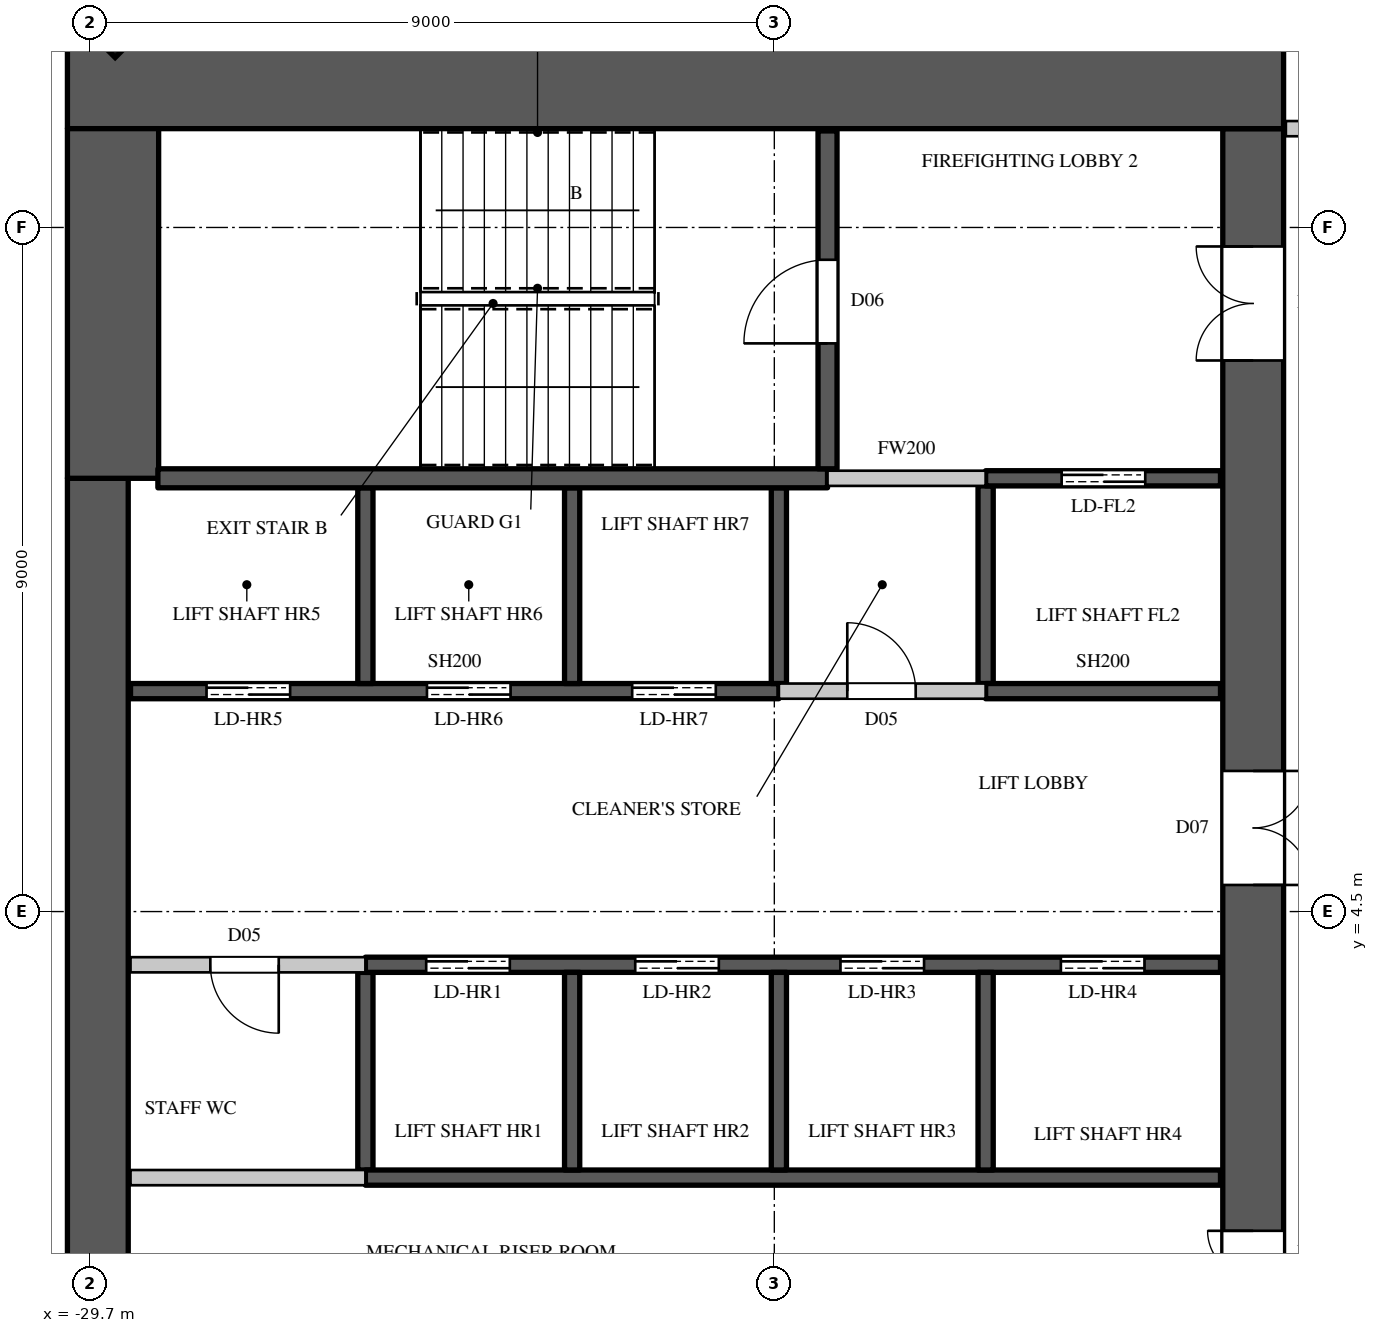
"""IFC4 building model, lengths in metres.
Left out: names, types, materials, properties, quantities, classifications, styles, units other than length and angle.
Written with IfcOpenShell. Run it as: python <this file> out.ifc"""

import sys

from ifc_helpers import new_model, si_unit, direction, frame, frame_2d, origin, origin_2d, place, context, subcontext, project, spatial, rectangle, extrude, element, fill, save


model = new_model("IFC4")
c1 = context("Model", 3, precision=1e-05, world=origin(), true_north=direction((0.0, 1.0)))
c2 = subcontext(c1, "Body", "Model", "MODEL_VIEW")
j1 = project(units=[si_unit("LENGTHUNIT", "METRE"), si_unit("PLANEANGLEUNIT", "RADIAN")], contexts=[c1])
p1 = place(None, origin())
s1 = spatial("IfcSite", under=j1, at=p1, CompositionType="ELEMENT")
p2 = place(p1, origin())
s2 = spatial("IfcBuilding", under=s1, at=p2, CompositionType="ELEMENT")
p3 = place(p2, frame((0.0, 0.0, 185.1)))
s3 = spatial("IfcBuildingStorey", under=s2, at=p3, CompositionType="ELEMENT", Elevation=185.1)
p4 = place(p3, frame((-29.443, 16.443, 0.0), z_axis=(0.0, 0.0, 1.0), x_axis=(-0.707106781187, -0.707106781187, 0.0)))
e1 = element("IfcColumn", 1, at=p4, inside=s3, PredefinedType="COLUMN", context=c2, shape_type="SweptSolid", body=[
    extrude(rectangle(XDim=0.9, YDim=1.1, at=origin_2d()), origin(), (0.0, 0.0, 1.0), 4.1),
])
p5 = place(p3, frame((-30.0, 15.4, 0.0), z_axis=(0.0, 0.0, 1.0), x_axis=(1.0, 0.0, 0.0)))
e2 = element("IfcWall", 2, at=p5, inside=s3, PredefinedType="SHEAR", context=c2, shape_type="SweptSolid", body=[
    extrude(rectangle(XDim=16.0, YDim=1.2, at=frame_2d((8.0, 0.0))), origin(), (0.0, 0.0, 1.0), 4.1),
])
p6 = place(p3, frame((-14.4, -14.8, 0.0), z_axis=(0.0, 0.0, 1.0), x_axis=(0.0, 1.0, 0.0)))
e3 = element("IfcWall", 3, at=p6, inside=s3, PredefinedType="SHEAR", context=c2, shape_type="SweptSolid", body=[
    extrude(rectangle(XDim=29.6, YDim=0.8, at=frame_2d((14.8, 0.0))), origin(), (0.0, 0.0, 1.0), 4.1),
])
p7 = place(p6, frame((1.55, 0.0, 0.0)))
e4 = element("IfcOpeningElement", 4, at=p7, cuts=e3, PredefinedType="OPENING", context=c2, shape_type="SweptSolid", body=[
    extrude(rectangle(XDim=1.5, YDim=2.4, at=frame_2d((0.75, 1.2))), frame((0.0, 0.41, 0.0), z_axis=(0.0, -1.0, 0.0), x_axis=(1.0, 0.0, 0.0)), (0.0, 0.0, 1.0), 0.82),
])
p8 = place(p6, frame((26.55, 0.0, 0.0)))
e5 = element("IfcOpeningElement", 5, at=p8, cuts=e3, PredefinedType="OPENING", context=c2, shape_type="SweptSolid", body=[
    extrude(rectangle(XDim=1.5, YDim=2.4, at=frame_2d((0.75, 1.2))), frame((0.0, 0.41, 0.0), z_axis=(0.0, -1.0, 0.0), x_axis=(1.0, 0.0, 0.0)), (0.0, 0.0, 1.0), 0.82),
])
p9 = place(p6, frame((8.45, 0.0, 0.0)))
e6 = element("IfcOpeningElement", 6, at=p9, cuts=e3, PredefinedType="OPENING", context=c2, shape_type="SweptSolid", body=[
    extrude(rectangle(XDim=1.5, YDim=2.4, at=frame_2d((0.75, 1.2))), frame((0.0, 0.41, 0.0), z_axis=(0.0, -1.0, 0.0), x_axis=(1.0, 0.0, 0.0)), (0.0, 0.0, 1.0), 0.82),
])
p10 = place(p6, frame((19.65, 0.0, 0.0)))
e7 = element("IfcOpeningElement", 7, at=p10, cuts=e3, PredefinedType="OPENING", context=c2, shape_type="SweptSolid", body=[
    extrude(rectangle(XDim=1.5, YDim=2.4, at=frame_2d((0.75, 1.2))), frame((0.0, 0.41, 0.0), z_axis=(0.0, -1.0, 0.0), x_axis=(1.0, 0.0, 0.0)), (0.0, 0.0, 1.0), 0.82),
])
p11 = place(p6, frame((14.5, 0.0, 0.0)))
e8 = element("IfcOpeningElement", 8, at=p11, cuts=e3, PredefinedType="OPENING", context=c2, shape_type="SweptSolid", body=[
    extrude(rectangle(XDim=0.6, YDim=2.0, at=frame_2d((0.3, 1.0))), frame((0.0, 0.41, 0.0), z_axis=(0.0, -1.0, 0.0), x_axis=(1.0, 0.0, 0.0)), (0.0, 0.0, 1.0), 0.82),
])
p12 = place(p3, frame((-29.6, -10.2, 0.0), z_axis=(0.0, 0.0, 1.0), x_axis=(0.0, 1.0, 0.0)))
e9 = element("IfcWall", 9, at=p12, inside=s3, PredefinedType="SHEAR", context=c2, shape_type="SweptSolid", body=[
    extrude(rectangle(XDim=20.4, YDim=0.8, at=frame_2d((10.2, 0.0))), origin(), (0.0, 0.0, 1.0), 4.1),
])
p13 = place(p3, frame((-29.4, 10.2, 0.0), z_axis=(0.0, 0.0, 1.0), x_axis=(0.0, 1.0, 0.0)))
e10 = element("IfcWall", 10, at=p13, inside=s3, PredefinedType="SHEAR", context=c2, shape_type="SweptSolid", body=[
    extrude(rectangle(XDim=4.6, YDim=1.2, at=frame_2d((2.3, 0.0))), origin(), (0.0, 0.0, 1.0), 4.1),
])
p14 = place(p3, frame((-29.17, 3.8, 0.0), z_axis=(0.0, 0.0, 1.0), x_axis=(1.0, 0.0, 0.0)))
e11 = element("IfcWall", 11, at=p14, inside=s3, PredefinedType="PARTITIONING", context=c2, shape_type="SweptSolid", body=[
    extrude(rectangle(XDim=3.09, YDim=0.2, at=frame_2d((1.545, 0.0))), origin(), (0.0, 0.0, 1.0), 3.8),
])
p15 = place(p14, frame((1.05, 0.0, 0.0)))
e12 = element("IfcOpeningElement", 12, at=p15, cuts=e11, PredefinedType="OPENING", context=c2, shape_type="SweptSolid", body=[
    extrude(rectangle(XDim=0.9, YDim=2.2, at=frame_2d((0.45, 1.1))), frame((0.0, 0.11, 0.0), z_axis=(0.0, -1.0, 0.0), x_axis=(1.0, 0.0, 0.0)), (0.0, 0.0, 1.0), 0.22),
])
p16 = place(p3, frame((-20.64, 7.4, 0.0), z_axis=(0.0, 0.0, 1.0), x_axis=(1.0, 0.0, 0.0)))
e13 = element("IfcWall", 13, at=p16, inside=s3, PredefinedType="PARTITIONING", context=c2, shape_type="SweptSolid", body=[
    extrude(rectangle(XDim=2.72, YDim=0.2, at=frame_2d((1.36, 0.0))), origin(), (0.0, 0.0, 1.0), 3.8),
])
p17 = place(p16, frame((0.9, 0.0, 0.0)))
e14 = element("IfcOpeningElement", 14, at=p17, cuts=e13, PredefinedType="OPENING", context=c2, shape_type="SweptSolid", body=[
    extrude(rectangle(XDim=0.9, YDim=2.2, at=frame_2d((0.45, 1.1))), frame((0.0, 0.11, 0.0), z_axis=(0.0, -1.0, 0.0), x_axis=(1.0, 0.0, 0.0)), (0.0, 0.0, 1.0), 0.22),
])
p18 = place(p3, frame((-20.0, 10.2, 0.0), z_axis=(0.0, 0.0, 1.0), x_axis=(1.0, 0.0, 0.0)))
e15 = element("IfcWall", 15, at=p18, inside=s3, PredefinedType="PARTITIONING", context=c2, shape_type="SweptSolid", body=[
    extrude(rectangle(XDim=2.08, YDim=0.2, at=frame_2d((1.04, 0.0))), origin(), (0.0, 0.0, 1.0), 3.8),
])
p19 = place(p3, frame((-13.97, 14.8, 0.0), z_axis=(0.0, 0.0, 1.0), x_axis=(1.0, 0.0, 0.0)))
e16 = element("IfcWall", 16, at=p19, inside=s3, PredefinedType="PARTITIONING", context=c2, shape_type="SweptSolid", body=[
    extrude(rectangle(XDim=2.87, YDim=0.2, at=frame_2d((1.435, 0.0))), origin(), (0.0, 0.0, 1.0), 3.8),
])
p20 = place(p3, frame((-29.17, 1.0, 0.0), z_axis=(0.0, 0.0, 1.0), x_axis=(1.0, 0.0, 0.0)))
e17 = element("IfcWall", 17, at=p20, inside=s3, PredefinedType="PARTITIONING", context=c2, shape_type="SweptSolid", body=[
    extrude(rectangle(XDim=3.09, YDim=0.2, at=frame_2d((1.545, 0.0))), origin(), (0.0, 0.0, 1.0), 3.8),
])
p21 = place(p3, frame((-29.17, 7.4, 0.0), z_axis=(0.0, 0.0, 1.0), x_axis=(1.0, 0.0, 0.0)))
e18 = element("IfcWall", 18, at=p21, inside=s3, PredefinedType="SHEAR", context=c2, shape_type="SweptSolid", body=[
    extrude(rectangle(XDim=8.53, YDim=0.2, at=frame_2d((4.265, 0.0))), origin(), (0.0, 0.0, 1.0), 3.8),
])
p22 = place(p21, frame((1.0, 0.0, 0.0)))
e19 = element("IfcOpeningElement", 19, at=p22, cuts=e18, PredefinedType="OPENING", context=c2, shape_type="SweptSolid", body=[
    extrude(rectangle(XDim=1.1, YDim=2.2, at=frame_2d((0.55, 1.1))), frame((0.0, 0.11, 0.0), z_axis=(0.0, -1.0, 0.0), x_axis=(1.0, 0.0, 0.0)), (0.0, 0.0, 1.0), 0.22),
])
p23 = place(p21, frame((3.9, 0.0, 0.0)))
e20 = element("IfcOpeningElement", 20, at=p23, cuts=e18, PredefinedType="OPENING", context=c2, shape_type="SweptSolid", body=[
    extrude(rectangle(XDim=1.1, YDim=2.2, at=frame_2d((0.55, 1.1))), frame((0.0, 0.11, 0.0), z_axis=(0.0, -1.0, 0.0), x_axis=(1.0, 0.0, 0.0)), (0.0, 0.0, 1.0), 0.22),
])
p24 = place(p21, frame((6.6, 0.0, 0.0)))
e21 = element("IfcOpeningElement", 21, at=p24, cuts=e18, PredefinedType="OPENING", context=c2, shape_type="SweptSolid", body=[
    extrude(rectangle(XDim=1.1, YDim=2.2, at=frame_2d((0.55, 1.1))), frame((0.0, 0.11, 0.0), z_axis=(0.0, -1.0, 0.0), x_axis=(1.0, 0.0, 0.0)), (0.0, 0.0, 1.0), 0.22),
])
p25 = place(p3, frame((-26.08, 1.1, 0.0), z_axis=(0.0, 0.0, 1.0), x_axis=(0.0, 1.0, 0.0)))
e22 = element("IfcWall", 22, at=p25, inside=s3, PredefinedType="SHEAR", context=c2, shape_type="SweptSolid", body=[
    extrude(rectangle(XDim=2.6, YDim=0.2, at=frame_2d((1.3, 0.0))), origin(), (0.0, 0.0, 1.0), 3.8),
])
p26 = place(p3, frame((-26.08, 1.0, 0.0), z_axis=(0.0, 0.0, 1.0), x_axis=(1.0, 0.0, 0.0)))
e23 = element("IfcWall", 23, at=p26, inside=s3, PredefinedType="SHEAR", context=c2, shape_type="SweptSolid", body=[
    extrude(rectangle(XDim=11.25, YDim=0.2, at=frame_2d((5.625, 0.0))), origin(), (0.0, 0.0, 1.0), 3.8),
])
p27 = place(p3, frame((-26.08, 3.8, 0.0), z_axis=(0.0, 0.0, 1.0), x_axis=(1.0, 0.0, 0.0)))
e24 = element("IfcWall", 24, at=p27, inside=s3, PredefinedType="SHEAR", context=c2, shape_type="SweptSolid", body=[
    extrude(rectangle(XDim=11.25, YDim=0.2, at=frame_2d((5.625, 0.0))), origin(), (0.0, 0.0, 1.0), 3.8),
])
p28 = place(p27, frame((0.8, 0.0, 0.0)))
e25 = element("IfcOpeningElement", 25, at=p28, cuts=e24, PredefinedType="OPENING", context=c2, shape_type="SweptSolid", body=[
    extrude(rectangle(XDim=1.1, YDim=2.2, at=frame_2d((0.55, 1.1))), frame((0.0, 0.11, 0.0), z_axis=(0.0, -1.0, 0.0), x_axis=(1.0, 0.0, 0.0)), (0.0, 0.0, 1.0), 0.22),
])
p29 = place(p27, frame((3.55, 0.0, 0.0)))
e26 = element("IfcOpeningElement", 26, at=p29, cuts=e24, PredefinedType="OPENING", context=c2, shape_type="SweptSolid", body=[
    extrude(rectangle(XDim=1.1, YDim=2.2, at=frame_2d((0.55, 1.1))), frame((0.0, 0.11, 0.0), z_axis=(0.0, -1.0, 0.0), x_axis=(1.0, 0.0, 0.0)), (0.0, 0.0, 1.0), 0.22),
])
p30 = place(p27, frame((6.25, 0.0, 0.0)))
e27 = element("IfcOpeningElement", 27, at=p30, cuts=e24, PredefinedType="OPENING", context=c2, shape_type="SweptSolid", body=[
    extrude(rectangle(XDim=1.1, YDim=2.2, at=frame_2d((0.55, 1.1))), frame((0.0, 0.11, 0.0), z_axis=(0.0, -1.0, 0.0), x_axis=(1.0, 0.0, 0.0)), (0.0, 0.0, 1.0), 0.22),
])
p31 = place(p27, frame((9.15, 0.0, 0.0)))
e28 = element("IfcOpeningElement", 28, at=p31, cuts=e24, PredefinedType="OPENING", context=c2, shape_type="SweptSolid", body=[
    extrude(rectangle(XDim=1.1, YDim=2.2, at=frame_2d((0.55, 1.1))), frame((0.0, 0.11, 0.0), z_axis=(0.0, -1.0, 0.0), x_axis=(1.0, 0.0, 0.0)), (0.0, 0.0, 1.0), 0.22),
])
p32 = place(p3, frame((-26.08, 7.5, 0.0), z_axis=(0.0, 0.0, 1.0), x_axis=(0.0, 1.0, 0.0)))
e29 = element("IfcWall", 29, at=p32, inside=s3, PredefinedType="SHEAR", context=c2, shape_type="SweptSolid", body=[
    extrude(rectangle(XDim=2.575, YDim=0.2, at=frame_2d((1.288, 0.0))), origin(), (0.0, 0.0, 1.0), 4.1),
])
p33 = place(p3, frame((-23.36, 1.1, 0.0), z_axis=(0.0, 0.0, 1.0), x_axis=(0.0, 1.0, 0.0)))
e30 = element("IfcWall", 30, at=p33, inside=s3, PredefinedType="SHEAR", context=c2, shape_type="SweptSolid", body=[
    extrude(rectangle(XDim=2.6, YDim=0.2, at=frame_2d((1.3, 0.0))), origin(), (0.0, 0.0, 1.0), 4.1),
])
p34 = place(p3, frame((-23.36, 7.5, 0.0), z_axis=(0.0, 0.0, 1.0), x_axis=(0.0, 1.0, 0.0)))
e31 = element("IfcWall", 31, at=p34, inside=s3, PredefinedType="SHEAR", context=c2, shape_type="SweptSolid", body=[
    extrude(rectangle(XDim=2.575, YDim=0.2, at=frame_2d((1.288, 0.0))), origin(), (0.0, 0.0, 1.0), 4.1),
])
p35 = place(p3, frame((-20.64, 1.1, 0.0), z_axis=(0.0, 0.0, 1.0), x_axis=(0.0, 1.0, 0.0)))
e32 = element("IfcWall", 32, at=p35, inside=s3, PredefinedType="SHEAR", context=c2, shape_type="SweptSolid", body=[
    extrude(rectangle(XDim=2.6, YDim=0.2, at=frame_2d((1.3, 0.0))), origin(), (0.0, 0.0, 1.0), 4.1),
])
p36 = place(p3, frame((-20.64, 7.5, 0.0), z_axis=(0.0, 0.0, 1.0), x_axis=(0.0, 1.0, 0.0)))
e33 = element("IfcWall", 33, at=p36, inside=s3, PredefinedType="SHEAR", context=c2, shape_type="SweptSolid", body=[
    extrude(rectangle(XDim=2.575, YDim=0.2, at=frame_2d((1.288, 0.0))), origin(), (0.0, 0.0, 1.0), 3.8),
])
p37 = place(p3, frame((-17.92, 1.1, 0.0), z_axis=(0.0, 0.0, 1.0), x_axis=(0.0, 1.0, 0.0)))
e34 = element("IfcWall", 34, at=p37, inside=s3, PredefinedType="SHEAR", context=c2, shape_type="SweptSolid", body=[
    extrude(rectangle(XDim=2.6, YDim=0.2, at=frame_2d((1.3, 0.0))), origin(), (0.0, 0.0, 1.0), 4.1),
])
p38 = place(p3, frame((-17.92, 7.5, 0.0), z_axis=(0.0, 0.0, 1.0), x_axis=(0.0, 1.0, 0.0)))
e35 = element("IfcWall", 35, at=p38, inside=s3, PredefinedType="SHEAR", context=c2, shape_type="SweptSolid", body=[
    extrude(rectangle(XDim=2.6, YDim=0.2, at=frame_2d((1.3, 0.0))), origin(), (0.0, 0.0, 1.0), 3.8),
])
p39 = place(p3, frame((-17.92, 7.4, 0.0), z_axis=(0.0, 0.0, 1.0), x_axis=(1.0, 0.0, 0.0)))
e36 = element("IfcWall", 36, at=p39, inside=s3, PredefinedType="SHEAR", context=c2, shape_type="SweptSolid", body=[
    extrude(rectangle(XDim=3.09, YDim=0.2, at=frame_2d((1.545, 0.0))), origin(), (0.0, 0.0, 1.0), 3.8),
])
p40 = place(p3, frame((-17.92, 10.2, 0.0), z_axis=(0.0, 0.0, 1.0), x_axis=(1.0, 0.0, 0.0)))
e37 = element("IfcWall", 37, at=p40, inside=s3, PredefinedType="SHEAR", context=c2, shape_type="SweptSolid", body=[
    extrude(rectangle(XDim=3.09, YDim=0.2, at=frame_2d((1.545, 0.0))), origin(), (0.0, 0.0, 1.0), 3.8),
])
p41 = place(p40, frame((1.0, 0.0, 0.0)))
e38 = element("IfcOpeningElement", 38, at=p41, cuts=e37, PredefinedType="OPENING", context=c2, shape_type="SweptSolid", body=[
    extrude(rectangle(XDim=1.1, YDim=2.2, at=frame_2d((0.55, 1.1))), frame((0.0, 0.11, 0.0), z_axis=(0.0, -1.0, 0.0), x_axis=(1.0, 0.0, 0.0)), (0.0, 0.0, 1.0), 0.22),
])
p42 = place(p3, frame((-28.81, 10.2, 0.0), z_axis=(0.0, 0.0, 1.0), x_axis=(1.0, 0.0, 0.0)))
e39 = element("IfcWall", 39, at=p42, inside=s3, PredefinedType="SHEAR", context=c2, shape_type="SweptSolid", body=[
    extrude(rectangle(XDim=8.81, YDim=0.25, at=frame_2d((4.405, 0.0))), origin(), (0.0, 0.0, 1.0), 3.8),
])
p43 = place(p3, frame((-20.0, 10.325, 0.0), z_axis=(0.0, 0.0, 1.0), x_axis=(0.0, 1.0, 0.0)))
e40 = element("IfcWall", 40, at=p43, inside=s3, PredefinedType="SHEAR", context=c2, shape_type="SweptSolid", body=[
    extrude(rectangle(XDim=4.445, YDim=0.25, at=frame_2d((2.223, 0.0))), origin(), (0.0, 0.0, 1.0), 3.8),
])
p44 = place(p43, frame((1.65, 0.0, 0.0)))
e41 = element("IfcOpeningElement", 41, at=p44, cuts=e40, PredefinedType="OPENING", context=c2, shape_type="SweptSolid", body=[
    extrude(rectangle(XDim=1.1, YDim=2.2, at=frame_2d((0.55, 1.1))), frame((0.0, 0.135, 0.0), z_axis=(0.0, -1.0, 0.0), x_axis=(1.0, 0.0, 0.0)), (0.0, 0.0, 1.0), 0.27),
])
p45 = place(p44, origin())
e42 = element("IfcDoor", 42, at=p45, inside=s3, OperationType="SINGLE_SWING_LEFT", PredefinedType="DOOR", context=c2, shape_type="SweptSolid", body=[
    extrude(rectangle(XDim=1.1, YDim=2.2, at=frame_2d((0.55, 1.1))), frame((0.0, 0.025, 0.0), z_axis=(0.0, -1.0, 0.0), x_axis=(1.0, 0.0, 0.0)), (0.0, 0.0, 1.0), 0.05),
])
fill(e41, e42)
p46 = place(p15, origin())
e43 = element("IfcDoor", 43, at=p46, inside=s3, OperationType="SINGLE_SWING_LEFT", PredefinedType="DOOR", context=c2, shape_type="SweptSolid", body=[
    extrude(rectangle(XDim=0.9, YDim=2.2, at=frame_2d((0.45, 1.1))), frame((0.0, 0.025, 0.0), z_axis=(0.0, -1.0, 0.0), x_axis=(1.0, 0.0, 0.0)), (0.0, 0.0, 1.0), 0.05),
])
fill(e12, e43)
p47 = place(p17, origin())
e44 = element("IfcDoor", 44, at=p47, inside=s3, OperationType="SINGLE_SWING_LEFT", PredefinedType="DOOR", context=c2, shape_type="SweptSolid", body=[
    extrude(rectangle(XDim=0.9, YDim=2.2, at=frame_2d((0.45, 1.1))), frame((0.0, 0.025, 0.0), z_axis=(0.0, -1.0, 0.0), x_axis=(1.0, 0.0, 0.0)), (0.0, 0.0, 1.0), 0.05),
])
fill(e14, e44)
p48 = place(p28, origin())
e45 = element("IfcDoor", 45, at=p48, inside=s3, OperationType="DOUBLE_DOOR_SLIDING", PredefinedType="DOOR", context=c2, shape_type="SweptSolid", body=[
    extrude(rectangle(XDim=1.1, YDim=2.2, at=frame_2d((0.55, 1.1))), frame((0.0, 0.025, 0.0), z_axis=(0.0, -1.0, 0.0), x_axis=(1.0, 0.0, 0.0)), (0.0, 0.0, 1.0), 0.05),
])
fill(e25, e45)
p49 = place(p29, origin())
e46 = element("IfcDoor", 46, at=p49, inside=s3, OperationType="DOUBLE_DOOR_SLIDING", PredefinedType="DOOR", context=c2, shape_type="SweptSolid", body=[
    extrude(rectangle(XDim=1.1, YDim=2.2, at=frame_2d((0.55, 1.1))), frame((0.0, 0.025, 0.0), z_axis=(0.0, -1.0, 0.0), x_axis=(1.0, 0.0, 0.0)), (0.0, 0.0, 1.0), 0.05),
])
fill(e26, e46)
p50 = place(p30, origin())
e47 = element("IfcDoor", 47, at=p50, inside=s3, OperationType="DOUBLE_DOOR_SLIDING", PredefinedType="DOOR", context=c2, shape_type="SweptSolid", body=[
    extrude(rectangle(XDim=1.1, YDim=2.2, at=frame_2d((0.55, 1.1))), frame((0.0, 0.025, 0.0), z_axis=(0.0, -1.0, 0.0), x_axis=(1.0, 0.0, 0.0)), (0.0, 0.0, 1.0), 0.05),
])
fill(e27, e47)
p51 = place(p31, origin())
e48 = element("IfcDoor", 48, at=p51, inside=s3, OperationType="DOUBLE_DOOR_SLIDING", PredefinedType="DOOR", context=c2, shape_type="SweptSolid", body=[
    extrude(rectangle(XDim=1.1, YDim=2.2, at=frame_2d((0.55, 1.1))), frame((0.0, 0.025, 0.0), z_axis=(0.0, -1.0, 0.0), x_axis=(1.0, 0.0, 0.0)), (0.0, 0.0, 1.0), 0.05),
])
fill(e28, e48)
p52 = place(p22, origin())
e49 = element("IfcDoor", 49, at=p52, inside=s3, OperationType="DOUBLE_DOOR_SLIDING", PredefinedType="DOOR", context=c2, shape_type="SweptSolid", body=[
    extrude(rectangle(XDim=1.1, YDim=2.2, at=frame_2d((0.55, 1.1))), frame((0.0, 0.025, 0.0), z_axis=(0.0, -1.0, 0.0), x_axis=(1.0, 0.0, 0.0)), (0.0, 0.0, 1.0), 0.05),
])
fill(e19, e49)
p53 = place(p23, origin())
e50 = element("IfcDoor", 50, at=p53, inside=s3, OperationType="DOUBLE_DOOR_SLIDING", PredefinedType="DOOR", context=c2, shape_type="SweptSolid", body=[
    extrude(rectangle(XDim=1.1, YDim=2.2, at=frame_2d((0.55, 1.1))), frame((0.0, 0.025, 0.0), z_axis=(0.0, -1.0, 0.0), x_axis=(1.0, 0.0, 0.0)), (0.0, 0.0, 1.0), 0.05),
])
fill(e20, e50)
p54 = place(p24, origin())
e51 = element("IfcDoor", 51, at=p54, inside=s3, OperationType="DOUBLE_DOOR_SLIDING", PredefinedType="DOOR", context=c2, shape_type="SweptSolid", body=[
    extrude(rectangle(XDim=1.1, YDim=2.2, at=frame_2d((0.55, 1.1))), frame((0.0, 0.025, 0.0), z_axis=(0.0, -1.0, 0.0), x_axis=(1.0, 0.0, 0.0)), (0.0, 0.0, 1.0), 0.05),
])
fill(e21, e51)
p55 = place(p41, origin())
e52 = element("IfcDoor", 52, at=p55, inside=s3, OperationType="DOUBLE_DOOR_SLIDING", PredefinedType="DOOR", context=c2, shape_type="SweptSolid", body=[
    extrude(rectangle(XDim=1.1, YDim=2.2, at=frame_2d((0.55, 1.1))), frame((0.0, 0.025, 0.0), z_axis=(0.0, -1.0, 0.0), x_axis=(1.0, 0.0, 0.0)), (0.0, 0.0, 1.0), 0.05),
])
fill(e38, e52)
p56 = place(p8, origin())
e53 = element("IfcDoor", 53, at=p56, inside=s3, OperationType="DOUBLE_DOOR_SINGLE_SWING", PredefinedType="DOOR", context=c2, shape_type="SweptSolid", body=[
    extrude(rectangle(XDim=1.5, YDim=2.4, at=frame_2d((0.75, 1.2))), frame((0.0, 0.395, 0.0), z_axis=(0.0, -1.0, 0.0), x_axis=(1.0, 0.0, 0.0)), (0.0, 0.0, 1.0), 0.05),
])
fill(e5, e53)
p57 = place(p10, origin())
e54 = element("IfcDoor", 54, at=p57, inside=s3, OperationType="DOUBLE_DOOR_SINGLE_SWING", PredefinedType="DOOR", context=c2, shape_type="SweptSolid", body=[
    extrude(rectangle(XDim=1.5, YDim=2.4, at=frame_2d((0.75, 1.2))), frame((0.0, -0.345, 0.0), z_axis=(0.0, -1.0, 0.0), x_axis=(1.0, 0.0, 0.0)), (0.0, 0.0, 1.0), 0.05),
])
fill(e7, e54)
p58 = place(p11, origin())
e55 = element("IfcDoor", 55, at=p58, inside=s3, OperationType="SINGLE_SWING_RIGHT", PredefinedType="DOOR", context=c2, shape_type="SweptSolid", body=[
    extrude(rectangle(XDim=0.6, YDim=2.0, at=frame_2d((0.3, 1.0))), frame((0.0, 0.395, 0.0), z_axis=(0.0, -1.0, 0.0), x_axis=(1.0, 0.0, 0.0)), (0.0, 0.0, 1.0), 0.05),
])
fill(e8, e55)
save(model, sys.argv[1])
